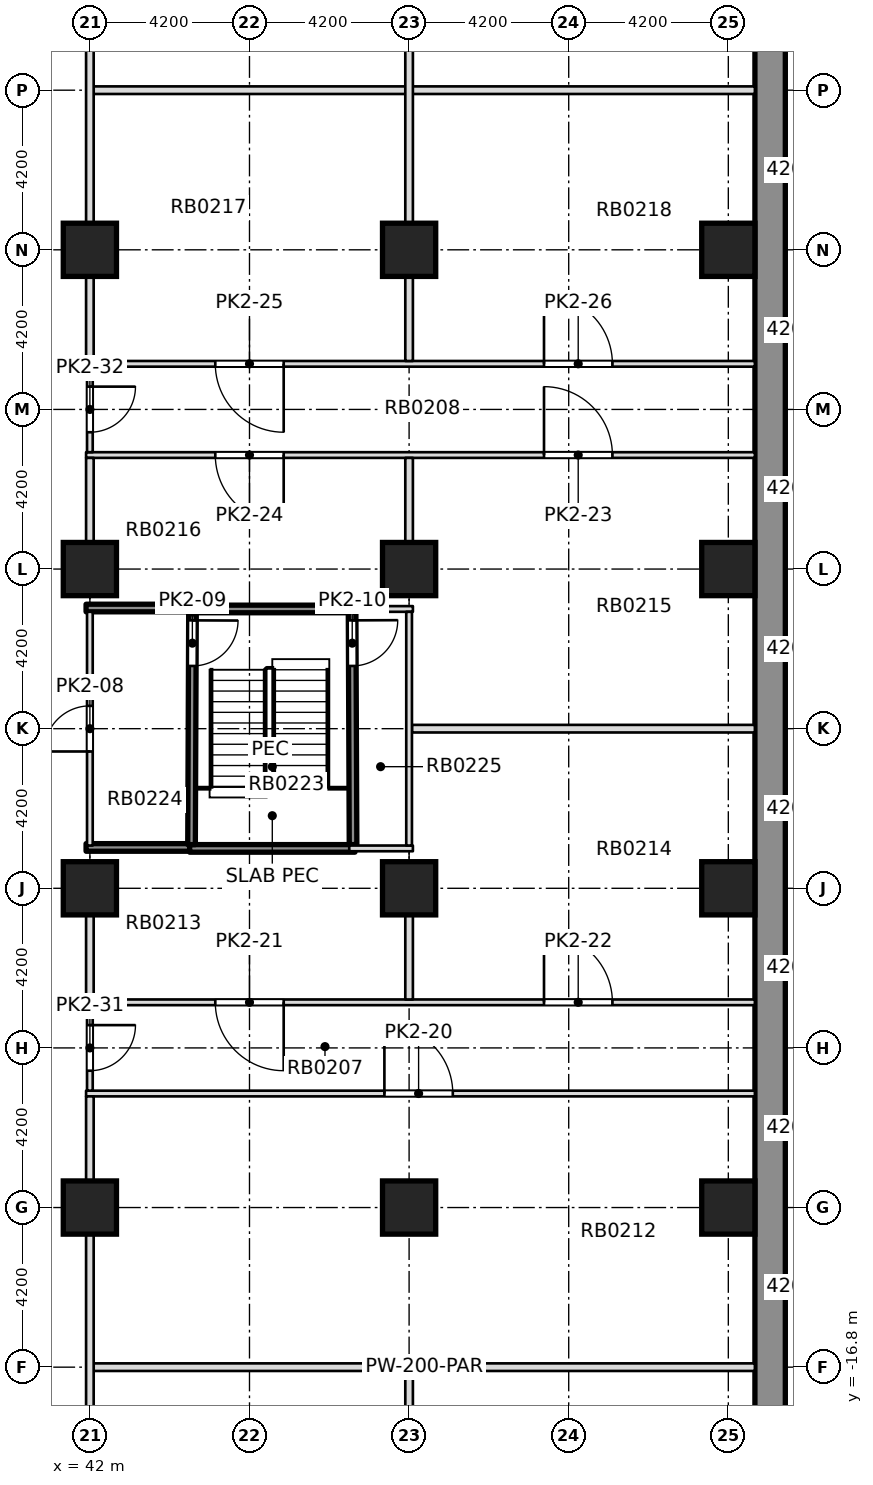
"""IFC4 building model, lengths in metres.
Left out: names, types, materials, properties, quantities, classifications, styles, units other than length and angle.
Written with IfcOpenShell. Run it as: python <this file> out.ifc"""

import sys

from ifc_helpers import new_model, si_unit, direction, frame, frame_2d, origin, origin_2d, place, context, subcontext, project, spatial, rectangle, extrude, element, fill, save


model = new_model("IFC4")
c1 = context("Model", 3, precision=1e-05, world=origin(), true_north=direction((0.0, 1.0)))
c2 = subcontext(c1, "Body", "Model", "MODEL_VIEW")
j1 = project(units=[si_unit("LENGTHUNIT", "METRE"), si_unit("PLANEANGLEUNIT", "RADIAN")], contexts=[c1])
p1 = place(None, origin())
s1 = spatial("IfcSite", under=j1, at=p1, CompositionType="ELEMENT")
p2 = place(p1, origin())
s2 = spatial("IfcBuilding", under=s1, at=p2, CompositionType="ELEMENT")
p3 = place(p2, frame((0.0, 0.0, -8.4)))
s3 = spatial("IfcBuildingStorey", under=s2, at=p3, CompositionType="ELEMENT", Elevation=-8.4)
p4 = place(p3, frame((59.9, -38.5, -0.5), z_axis=(0.0, 0.0, 1.0), x_axis=(0.0, 1.0, 0.0)))
e1 = element("IfcWall", 1, at=p4, inside=s3, PredefinedType="SOLIDWALL", context=c2, shape_type="SweptSolid", body=[
    extrude(rectangle(XDim=77.0, YDim=0.8, at=frame_2d((38.5, 0.0))), origin(), (0.0, 0.0, 1.0), 4.7),
])
for number, where, z_axis, x_axis in (
    (2, (42.0, -12.6, -0.5), (0.0, 0.0, 1.0), (1.0, 0.0, 0.0)),
    (3, (50.4, -12.6, -0.5), (0.0, 0.0, 1.0), (1.0, 0.0, 0.0)),
    (4, (58.8, -12.6, -0.5), (0.0, 0.0, 1.0), (1.0, 0.0, 0.0)),
    (5, (42.0, -4.2, -0.5), (0.0, 0.0, 1.0), (1.0, 0.0, 0.0)),
    (6, (50.4, -4.2, -0.5), (0.0, 0.0, 1.0), (1.0, 0.0, 0.0)),
    (7, (58.8, -4.2, -0.5), (0.0, 0.0, 1.0), (1.0, 0.0, 0.0)),
    (8, (42.0, 4.2, -0.5), (0.0, 0.0, 1.0), (1.0, 0.0, 0.0)),
    (9, (50.4, 4.2, -0.5), (0.0, 0.0, 1.0), (1.0, 0.0, 0.0)),
    (10, (58.8, 4.2, -0.5), (0.0, 0.0, 1.0), (1.0, 0.0, 0.0)),
    (11, (42.0, 12.6, -0.5), (0.0, 0.0, 1.0), (1.0, 0.0, 0.0)),
    (12, (50.4, 12.6, -0.5), (0.0, 0.0, 1.0), (1.0, 0.0, 0.0)),
    (13, (58.8, 12.6, -0.5), (0.0, 0.0, 1.0), (1.0, 0.0, 0.0)),
):
    element("IfcColumn", number, at=place(p3, frame(where, z_axis=z_axis, x_axis=x_axis)), inside=s3, PredefinedType="COLUMN", context=c2, shape_type="SweptSolid", body=[
        extrude(rectangle(XDim=1.4, YDim=1.4, at=origin_2d()), origin(), (0.0, 0.0, 1.0), 4.7),
    ])
p5 = place(p3, frame((42.1, -16.8, 0.0), z_axis=(0.0, 0.0, 1.0), x_axis=(1.0, 0.0, 0.0)))
e14 = element("IfcWall", 14, at=p5, inside=s3, PredefinedType="PARTITIONING", context=c2, shape_type="SweptSolid", body=[
    extrude(rectangle(XDim=17.399, YDim=0.2, at=frame_2d((8.699, 0.0))), origin(), (0.0, 0.0, 1.0), 3.85),
])
p6 = place(p3, frame((41.9, -9.6, 0.0), z_axis=(0.0, 0.0, 1.0), x_axis=(1.0, 0.0, 0.0)))
e15 = element("IfcWall", 15, at=p6, inside=s3, PredefinedType="PARTITIONING", context=c2, shape_type="SweptSolid", body=[
    extrude(rectangle(XDim=17.599, YDim=0.15, at=frame_2d((8.8, 0.0))), origin(), (0.0, 0.0, 1.0), 3.85),
])
p7 = place(p6, frame((7.85, 0.0, 0.0)))
e16 = element("IfcOpeningElement", 16, at=p7, cuts=e15, PredefinedType="OPENING", context=c2, shape_type="SweptSolid", body=[
    extrude(rectangle(XDim=1.8, YDim=2.1, at=frame_2d((0.9, 1.05))), frame((0.0, 0.085, 0.0), z_axis=(0.0, -1.0, 0.0), x_axis=(1.0, 0.0, 0.0)), (0.0, 0.0, 1.0), 0.17),
])
p8 = place(p3, frame((41.9, -7.2, 0.0), z_axis=(0.0, 0.0, 1.0), x_axis=(1.0, 0.0, 0.0)))
e17 = element("IfcWall", 17, at=p8, inside=s3, PredefinedType="PARTITIONING", context=c2, shape_type="SweptSolid", body=[
    extrude(rectangle(XDim=17.599, YDim=0.15, at=frame_2d((8.8, 0.0))), origin(), (0.0, 0.0, 1.0), 3.85),
])
p9 = place(p8, frame((3.4, 0.0, 0.0)))
e18 = element("IfcOpeningElement", 18, at=p9, cuts=e17, PredefinedType="OPENING", context=c2, shape_type="SweptSolid", body=[
    extrude(rectangle(XDim=1.8, YDim=2.1, at=frame_2d((0.9, 1.05))), frame((0.0, 0.085, 0.0), z_axis=(0.0, -1.0, 0.0), x_axis=(1.0, 0.0, 0.0)), (0.0, 0.0, 1.0), 0.17),
])
p10 = place(p8, frame((12.05, 0.0, 0.0)))
e19 = element("IfcOpeningElement", 19, at=p10, cuts=e17, PredefinedType="OPENING", context=c2, shape_type="SweptSolid", body=[
    extrude(rectangle(XDim=1.8, YDim=2.1, at=frame_2d((0.9, 1.05))), frame((0.0, 0.085, 0.0), z_axis=(0.0, -1.0, 0.0), x_axis=(1.0, 0.0, 0.0)), (0.0, 0.0, 1.0), 0.17),
])
p11 = place(p3, frame((41.9, -3.125, 0.0), z_axis=(0.0, 0.0, 1.0), x_axis=(1.0, 0.0, 0.0)))
e20 = element("IfcWall", 20, at=p11, inside=s3, PredefinedType="SOLIDWALL", context=c2, shape_type="SweptSolid", body=[
    extrude(rectangle(XDim=2.875, YDim=0.2, at=frame_2d((1.438, 0.0))), origin(), (0.0, 0.0, 1.0), 3.85),
])
p12 = place(p3, frame((44.625, -3.15, 0.0), z_axis=(0.0, 0.0, 1.0), x_axis=(1.0, 0.0, 0.0)))
e21 = element("IfcWall", 21, at=p12, inside=s3, PredefinedType="SOLIDWALL", context=c2, shape_type="SweptSolid", body=[
    extrude(rectangle(XDim=4.35, YDim=0.2, at=frame_2d((2.175, 0.0))), origin(), (0.0, 0.0, 1.0), 3.85),
])
p13 = place(p3, frame((48.825, -3.15, 0.0), z_axis=(0.0, 0.0, 1.0), x_axis=(1.0, 0.0, 0.0)))
e22 = element("IfcWall", 22, at=p13, inside=s3, PredefinedType="PARTITIONING", context=c2, shape_type="SweptSolid", body=[
    extrude(rectangle(XDim=1.675, YDim=0.15, at=frame_2d((0.837, 0.0))), origin(), (0.0, 0.0, 1.0), 3.85),
])
p14 = place(p3, frame((50.475, 0.0, 0.0), z_axis=(0.0, 0.0, 1.0), x_axis=(1.0, 0.0, 0.0)))
e23 = element("IfcWall", 23, at=p14, inside=s3, PredefinedType="PARTITIONING", context=c2, shape_type="SweptSolid", body=[
    extrude(rectangle(XDim=9.024, YDim=0.2, at=frame_2d((4.512, 0.0))), origin(), (0.0, 0.0, 1.0), 3.85),
])
p15 = place(p3, frame((41.9, 3.175, 0.0), z_axis=(0.0, 0.0, 1.0), x_axis=(1.0, 0.0, 0.0)))
e24 = element("IfcWall", 24, at=p15, inside=s3, PredefinedType="SOLIDWALL", context=c2, shape_type="SweptSolid", body=[
    extrude(rectangle(XDim=2.875, YDim=0.2, at=frame_2d((1.438, 0.0))), origin(), (0.0, 0.0, 1.0), 3.85),
])
p16 = place(p3, frame((44.625, 3.15, 0.0), z_axis=(0.0, 0.0, 1.0), x_axis=(1.0, 0.0, 0.0)))
e25 = element("IfcWall", 25, at=p16, inside=s3, PredefinedType="SOLIDWALL", context=c2, shape_type="SweptSolid", body=[
    extrude(rectangle(XDim=4.35, YDim=0.2, at=frame_2d((2.175, 0.0))), origin(), (0.0, 0.0, 1.0), 3.85),
])
p17 = place(p3, frame((48.825, 3.15, 0.0), z_axis=(0.0, 0.0, 1.0), x_axis=(1.0, 0.0, 0.0)))
e26 = element("IfcWall", 26, at=p17, inside=s3, PredefinedType="PARTITIONING", context=c2, shape_type="SweptSolid", body=[
    extrude(rectangle(XDim=1.675, YDim=0.15, at=frame_2d((0.837, 0.0))), origin(), (0.0, 0.0, 1.0), 3.85),
])
p18 = place(p3, frame((41.9, 7.2, 0.0), z_axis=(0.0, 0.0, 1.0), x_axis=(1.0, 0.0, 0.0)))
e27 = element("IfcWall", 27, at=p18, inside=s3, PredefinedType="PARTITIONING", context=c2, shape_type="SweptSolid", body=[
    extrude(rectangle(XDim=17.599, YDim=0.15, at=frame_2d((8.8, 0.0))), origin(), (0.0, 0.0, 1.0), 3.85),
])
p19 = place(p18, frame((12.05, 0.0, 0.0)))
e28 = element("IfcOpeningElement", 28, at=p19, cuts=e27, PredefinedType="OPENING", context=c2, shape_type="SweptSolid", body=[
    extrude(rectangle(XDim=1.8, YDim=2.1, at=frame_2d((0.9, 1.05))), frame((0.0, 0.085, 0.0), z_axis=(0.0, -1.0, 0.0), x_axis=(1.0, 0.0, 0.0)), (0.0, 0.0, 1.0), 0.17),
])
p20 = place(p18, frame((3.4, 0.0, 0.0)))
e29 = element("IfcOpeningElement", 29, at=p20, cuts=e27, PredefinedType="OPENING", context=c2, shape_type="SweptSolid", body=[
    extrude(rectangle(XDim=1.8, YDim=2.1, at=frame_2d((0.9, 1.05))), frame((0.0, 0.085, 0.0), z_axis=(0.0, -1.0, 0.0), x_axis=(1.0, 0.0, 0.0)), (0.0, 0.0, 1.0), 0.17),
])
p21 = place(p3, frame((41.9, 9.6, 0.0), z_axis=(0.0, 0.0, 1.0), x_axis=(1.0, 0.0, 0.0)))
e30 = element("IfcWall", 30, at=p21, inside=s3, PredefinedType="PARTITIONING", context=c2, shape_type="SweptSolid", body=[
    extrude(rectangle(XDim=17.599, YDim=0.15, at=frame_2d((8.8, 0.0))), origin(), (0.0, 0.0, 1.0), 3.85),
])
p22 = place(p21, frame((3.4, 0.0, 0.0)))
e31 = element("IfcOpeningElement", 31, at=p22, cuts=e30, PredefinedType="OPENING", context=c2, shape_type="SweptSolid", body=[
    extrude(rectangle(XDim=1.8, YDim=2.1, at=frame_2d((0.9, 1.05))), frame((0.0, 0.085, 0.0), z_axis=(0.0, -1.0, 0.0), x_axis=(1.0, 0.0, 0.0)), (0.0, 0.0, 1.0), 0.17),
])
p23 = place(p21, frame((12.05, 0.0, 0.0)))
e32 = element("IfcOpeningElement", 32, at=p23, cuts=e30, PredefinedType="OPENING", context=c2, shape_type="SweptSolid", body=[
    extrude(rectangle(XDim=1.8, YDim=2.1, at=frame_2d((0.9, 1.05))), frame((0.0, 0.085, 0.0), z_axis=(0.0, -1.0, 0.0), x_axis=(1.0, 0.0, 0.0)), (0.0, 0.0, 1.0), 0.17),
])
p24 = place(p3, frame((42.1, 16.8, 0.0), z_axis=(0.0, 0.0, 1.0), x_axis=(1.0, 0.0, 0.0)))
e33 = element("IfcWall", 33, at=p24, inside=s3, PredefinedType="PARTITIONING", context=c2, shape_type="SweptSolid", body=[
    extrude(rectangle(XDim=17.399, YDim=0.2, at=frame_2d((8.699, 0.0))), origin(), (0.0, 0.0, 1.0), 3.85),
])
p25 = place(p3, frame((42.0, -20.3, 0.0), z_axis=(0.0, 0.0, 1.0), x_axis=(0.0, 1.0, 0.0)))
e34 = element("IfcWall", 34, at=p25, inside=s3, PredefinedType="PARTITIONING", context=c2, shape_type="SweptSolid", body=[
    extrude(rectangle(XDim=7.0, YDim=0.2, at=frame_2d((3.5, 0.0))), origin(), (0.0, 0.0, 1.0), 3.85),
])
p26 = place(p3, frame((42.0, -11.9, 0.0), z_axis=(0.0, 0.0, 1.0), x_axis=(0.0, 1.0, 0.0)))
e35 = element("IfcWall", 35, at=p26, inside=s3, PredefinedType="PARTITIONING", context=c2, shape_type="SweptSolid", body=[
    extrude(rectangle(XDim=2.225, YDim=0.2, at=frame_2d((1.112, 0.0))), origin(), (0.0, 0.0, 1.0), 3.85),
])
p27 = place(p3, frame((42.0, -9.525, 0.0), z_axis=(0.0, 0.0, 1.0), x_axis=(0.0, 1.0, 0.0)))
e36 = element("IfcWall", 36, at=p27, inside=s3, PredefinedType="PARTITIONING", context=c2, shape_type="SweptSolid", body=[
    extrude(rectangle(XDim=2.25, YDim=0.15, at=frame_2d((1.125, 0.0))), origin(), (0.0, 0.0, 1.0), 3.85),
])
p28 = place(p27, frame((0.525, 0.0, 0.0)))
e37 = element("IfcOpeningElement", 37, at=p28, cuts=e36, PredefinedType="OPENING", context=c2, shape_type="SweptSolid", body=[
    extrude(rectangle(XDim=1.2, YDim=2.1, at=frame_2d((0.6, 1.05))), frame((0.0, 0.085, 0.0), z_axis=(0.0, -1.0, 0.0), x_axis=(1.0, 0.0, 0.0)), (0.0, 0.0, 1.0), 0.17),
])
p29 = place(p3, frame((42.0, -7.125, 0.0), z_axis=(0.0, 0.0, 1.0), x_axis=(0.0, 1.0, 0.0)))
e38 = element("IfcWall", 38, at=p29, inside=s3, PredefinedType="PARTITIONING", context=c2, shape_type="SweptSolid", body=[
    extrude(rectangle(XDim=2.225, YDim=0.2, at=frame_2d((1.113, 0.0))), origin(), (0.0, 0.0, 1.0), 3.85),
])
p30 = place(p3, frame((42.0, -3.075, 0.0), z_axis=(0.0, 0.0, 1.0), x_axis=(0.0, 1.0, 0.0)))
e39 = element("IfcWall", 39, at=p30, inside=s3, PredefinedType="PARTITIONING", context=c2, shape_type="SweptSolid", body=[
    extrude(rectangle(XDim=6.15, YDim=0.15, at=frame_2d((3.075, 0.0))), origin(), (0.0, 0.0, 1.0), 3.85),
])
p31 = place(p30, frame((2.475, 0.0, 0.0)))
e40 = element("IfcOpeningElement", 40, at=p31, cuts=e39, PredefinedType="OPENING", context=c2, shape_type="SweptSolid", body=[
    extrude(rectangle(XDim=1.2, YDim=2.1, at=frame_2d((0.6, 1.05))), frame((0.0, 0.085, 0.0), z_axis=(0.0, -1.0, 0.0), x_axis=(1.0, 0.0, 0.0)), (0.0, 0.0, 1.0), 0.17),
])
p32 = place(p3, frame((42.0, 4.9, 0.0), z_axis=(0.0, 0.0, 1.0), x_axis=(0.0, 1.0, 0.0)))
e41 = element("IfcWall", 41, at=p32, inside=s3, PredefinedType="PARTITIONING", context=c2, shape_type="SweptSolid", body=[
    extrude(rectangle(XDim=2.225, YDim=0.2, at=frame_2d((1.113, 0.0))), origin(), (0.0, 0.0, 1.0), 3.85),
])
p33 = place(p3, frame((42.0, 7.275, 0.0), z_axis=(0.0, 0.0, 1.0), x_axis=(0.0, 1.0, 0.0)))
e42 = element("IfcWall", 42, at=p33, inside=s3, PredefinedType="PARTITIONING", context=c2, shape_type="SweptSolid", body=[
    extrude(rectangle(XDim=2.25, YDim=0.15, at=frame_2d((1.125, 0.0))), origin(), (0.0, 0.0, 1.0), 3.85),
])
p34 = place(p33, frame((0.525, 0.0, 0.0)))
e43 = element("IfcOpeningElement", 43, at=p34, cuts=e42, PredefinedType="OPENING", context=c2, shape_type="SweptSolid", body=[
    extrude(rectangle(XDim=1.2, YDim=2.1, at=frame_2d((0.6, 1.05))), frame((0.0, 0.085, 0.0), z_axis=(0.0, -1.0, 0.0), x_axis=(1.0, 0.0, 0.0)), (0.0, 0.0, 1.0), 0.17),
])
p35 = place(p3, frame((42.0, 9.675, 0.0), z_axis=(0.0, 0.0, 1.0), x_axis=(0.0, 1.0, 0.0)))
e44 = element("IfcWall", 44, at=p35, inside=s3, PredefinedType="PARTITIONING", context=c2, shape_type="SweptSolid", body=[
    extrude(rectangle(XDim=2.225, YDim=0.2, at=frame_2d((1.112, 0.0))), origin(), (0.0, 0.0, 1.0), 3.85),
])
p36 = place(p3, frame((42.0, 13.3, 0.0), z_axis=(0.0, 0.0, 1.0), x_axis=(0.0, 1.0, 0.0)))
e45 = element("IfcWall", 45, at=p36, inside=s3, PredefinedType="PARTITIONING", context=c2, shape_type="SweptSolid", body=[
    extrude(rectangle(XDim=7.0, YDim=0.2, at=frame_2d((3.5, 0.0))), origin(), (0.0, 0.0, 1.0), 3.85),
])
p37 = place(p3, frame((44.675, -3.05, 0.0), z_axis=(0.0, 0.0, 1.0), x_axis=(0.004098985015, 0.999991599126, 0.0)))
e46 = element("IfcWall", 46, at=p37, inside=s3, PredefinedType="SOLIDWALL", context=c2, shape_type="SweptSolid", body=[
    extrude(rectangle(XDim=6.075, YDim=0.2, at=frame_2d((3.038, 0.0))), origin(), (0.0, 0.0, 1.0), 3.85),
])
p38 = place(p37, frame((4.7, 0.0, 0.0)))
e47 = element("IfcOpeningElement", 47, at=p38, cuts=e46, PredefinedType="OPENING", context=c2, shape_type="SweptSolid", body=[
    extrude(rectangle(XDim=1.2, YDim=2.1, at=frame_2d((0.6, 1.05))), frame((0.0, 0.11, 0.0), z_axis=(0.0, -1.0, 0.0), x_axis=(1.0, 0.0, 0.0)), (0.0, 0.0, 1.0), 0.22),
])
p39 = place(p3, frame((48.925, -3.05, 0.0), z_axis=(0.0, 0.0, 1.0), x_axis=(-0.004065655173, 0.99999173519, 0.0)))
e48 = element("IfcWall", 48, at=p39, inside=s3, PredefinedType="SOLIDWALL", context=c2, shape_type="SweptSolid", body=[
    extrude(rectangle(XDim=6.125, YDim=0.2, at=frame_2d((3.062, 0.0))), origin(), (0.0, 0.0, 1.0), 3.85),
])
p40 = place(p39, frame((4.7, 0.0, 0.0)))
e49 = element("IfcOpeningElement", 49, at=p40, cuts=e48, PredefinedType="OPENING", context=c2, shape_type="SweptSolid", body=[
    extrude(rectangle(XDim=1.2, YDim=2.1, at=frame_2d((0.6, 1.05))), frame((0.0, 0.11, 0.0), z_axis=(0.0, -1.0, 0.0), x_axis=(1.0, 0.0, 0.0)), (0.0, 0.0, 1.0), 0.22),
])
p41 = place(p3, frame((50.4, -20.3, 0.0), z_axis=(0.0, 0.0, 1.0), x_axis=(0.0, 1.0, 0.0)))
e50 = element("IfcWall", 50, at=p41, inside=s3, PredefinedType="PARTITIONING", context=c2, shape_type="SweptSolid", body=[
    extrude(rectangle(XDim=3.4, YDim=0.2, at=frame_2d((1.7, 0.0))), origin(), (0.0, 0.0, 1.0), 3.85),
])
p42 = place(p3, frame((50.4, -7.125, 0.0), z_axis=(0.0, 0.0, 1.0), x_axis=(0.0, 1.0, 0.0)))
e51 = element("IfcWall", 51, at=p42, inside=s3, PredefinedType="PARTITIONING", context=c2, shape_type="SweptSolid", body=[
    extrude(rectangle(XDim=2.225, YDim=0.2, at=frame_2d((1.113, 0.0))), origin(), (0.0, 0.0, 1.0), 3.85),
])
p43 = place(p3, frame((50.4, -3.075, 0.0), z_axis=(0.0, 0.0, 1.0), x_axis=(0.0, 1.0, 0.0)))
e52 = element("IfcWall", 52, at=p43, inside=s3, PredefinedType="PARTITIONING", context=c2, shape_type="SweptSolid", body=[
    extrude(rectangle(XDim=6.15, YDim=0.15, at=frame_2d((3.075, 0.0))), origin(), (0.0, 0.0, 1.0), 3.85),
])
p44 = place(p3, frame((50.4, 4.9, 0.0), z_axis=(0.0, 0.0, 1.0), x_axis=(0.0, 1.0, 0.0)))
e53 = element("IfcWall", 53, at=p44, inside=s3, PredefinedType="PARTITIONING", context=c2, shape_type="SweptSolid", body=[
    extrude(rectangle(XDim=2.225, YDim=0.2, at=frame_2d((1.113, 0.0))), origin(), (0.0, 0.0, 1.0), 3.85),
])
p45 = place(p3, frame((50.4, 9.675, 0.0), z_axis=(0.0, 0.0, 1.0), x_axis=(0.0, 1.0, 0.0)))
e54 = element("IfcWall", 54, at=p45, inside=s3, PredefinedType="PARTITIONING", context=c2, shape_type="SweptSolid", body=[
    extrude(rectangle(XDim=2.225, YDim=0.2, at=frame_2d((1.112, 0.0))), origin(), (0.0, 0.0, 1.0), 3.85),
])
p46 = place(p3, frame((50.4, 13.3, 0.0), z_axis=(0.0, 0.0, 1.0), x_axis=(0.0, 1.0, 0.0)))
e55 = element("IfcWall", 55, at=p46, inside=s3, PredefinedType="PARTITIONING", context=c2, shape_type="SweptSolid", body=[
    extrude(rectangle(XDim=7.0, YDim=0.2, at=frame_2d((3.5, 0.0))), origin(), (0.0, 0.0, 1.0), 3.85),
])
p47 = place(p31, origin())
e56 = element("IfcDoor", 56, at=p47, inside=s3, OperationType="DOUBLE_DOOR_SINGLE_SWING", PredefinedType="DOOR", context=c2, shape_type="SweptSolid", body=[
    extrude(rectangle(XDim=1.2, YDim=2.1, at=frame_2d((0.6, 1.05))), frame((0.0, 0.025, 0.0), z_axis=(0.0, -1.0, 0.0), x_axis=(1.0, 0.0, 0.0)), (0.0, 0.0, 1.0), 0.05),
])
fill(e40, e56)
p48 = place(p38, origin())
e57 = element("IfcDoor", 57, at=p48, inside=s3, OperationType="DOUBLE_DOOR_SINGLE_SWING", PredefinedType="DOOR", context=c2, shape_type="SweptSolid", body=[
    extrude(rectangle(XDim=1.2, YDim=2.1, at=frame_2d((0.6, 1.05))), frame((0.0, 0.025, 0.0), z_axis=(0.0, -1.0, 0.0), x_axis=(1.0, 0.0, 0.0)), (0.0, 0.0, 1.0), 0.05),
])
fill(e47, e57)
p49 = place(p40, origin())
e58 = element("IfcDoor", 58, at=p49, inside=s3, OperationType="DOUBLE_DOOR_SINGLE_SWING", PredefinedType="DOOR", context=c2, shape_type="SweptSolid", body=[
    extrude(rectangle(XDim=1.2, YDim=2.1, at=frame_2d((0.6, 1.05))), frame((0.0, 0.025, 0.0), z_axis=(0.0, -1.0, 0.0), x_axis=(1.0, 0.0, 0.0)), (0.0, 0.0, 1.0), 0.05),
])
fill(e49, e58)
p50 = place(p7, origin())
e59 = element("IfcDoor", 59, at=p50, inside=s3, OperationType="DOUBLE_DOOR_SINGLE_SWING", PredefinedType="DOOR", context=c2, shape_type="SweptSolid", body=[
    extrude(rectangle(XDim=1.8, YDim=2.1, at=frame_2d((0.9, 1.05))), frame((0.0, 0.025, 0.0), z_axis=(0.0, -1.0, 0.0), x_axis=(1.0, 0.0, 0.0)), (0.0, 0.0, 1.0), 0.05),
])
fill(e16, e59)
p51 = place(p9, origin())
e60 = element("IfcDoor", 60, at=p51, inside=s3, OperationType="DOUBLE_DOOR_SINGLE_SWING", PredefinedType="DOOR", context=c2, shape_type="SweptSolid", body=[
    extrude(rectangle(XDim=1.8, YDim=2.1, at=frame_2d((0.9, 1.05))), frame((0.0, 0.025, 0.0), z_axis=(0.0, -1.0, 0.0), x_axis=(1.0, 0.0, 0.0)), (0.0, 0.0, 1.0), 0.05),
])
fill(e18, e60)
p52 = place(p10, origin())
e61 = element("IfcDoor", 61, at=p52, inside=s3, OperationType="DOUBLE_DOOR_SINGLE_SWING", PredefinedType="DOOR", context=c2, shape_type="SweptSolid", body=[
    extrude(rectangle(XDim=1.8, YDim=2.1, at=frame_2d((0.9, 1.05))), frame((0.0, 0.025, 0.0), z_axis=(0.0, -1.0, 0.0), x_axis=(1.0, 0.0, 0.0)), (0.0, 0.0, 1.0), 0.05),
])
fill(e19, e61)
p53 = place(p19, origin())
e62 = element("IfcDoor", 62, at=p53, inside=s3, OperationType="DOUBLE_DOOR_SINGLE_SWING", PredefinedType="DOOR", context=c2, shape_type="SweptSolid", body=[
    extrude(rectangle(XDim=1.8, YDim=2.1, at=frame_2d((0.9, 1.05))), frame((0.0, 0.025, 0.0), z_axis=(0.0, -1.0, 0.0), x_axis=(1.0, 0.0, 0.0)), (0.0, 0.0, 1.0), 0.05),
])
fill(e28, e62)
p54 = place(p20, origin())
e63 = element("IfcDoor", 63, at=p54, inside=s3, OperationType="DOUBLE_DOOR_SINGLE_SWING", PredefinedType="DOOR", context=c2, shape_type="SweptSolid", body=[
    extrude(rectangle(XDim=1.8, YDim=2.1, at=frame_2d((0.9, 1.05))), frame((0.0, 0.025, 0.0), z_axis=(0.0, -1.0, 0.0), x_axis=(1.0, 0.0, 0.0)), (0.0, 0.0, 1.0), 0.05),
])
fill(e29, e63)
p55 = place(p22, origin())
e64 = element("IfcDoor", 64, at=p55, inside=s3, OperationType="DOUBLE_DOOR_SINGLE_SWING", PredefinedType="DOOR", context=c2, shape_type="SweptSolid", body=[
    extrude(rectangle(XDim=1.8, YDim=2.1, at=frame_2d((0.9, 1.05))), frame((0.0, 0.025, 0.0), z_axis=(0.0, -1.0, 0.0), x_axis=(1.0, 0.0, 0.0)), (0.0, 0.0, 1.0), 0.05),
])
fill(e31, e64)
p56 = place(p23, origin())
e65 = element("IfcDoor", 65, at=p56, inside=s3, OperationType="DOUBLE_DOOR_SINGLE_SWING", PredefinedType="DOOR", context=c2, shape_type="SweptSolid", body=[
    extrude(rectangle(XDim=1.8, YDim=2.1, at=frame_2d((0.9, 1.05))), frame((0.0, 0.025, 0.0), z_axis=(0.0, -1.0, 0.0), x_axis=(1.0, 0.0, 0.0)), (0.0, 0.0, 1.0), 0.05),
])
fill(e32, e65)
p57 = place(p28, origin())
e66 = element("IfcDoor", 66, at=p57, inside=s3, OperationType="SINGLE_SWING_RIGHT", PredefinedType="DOOR", context=c2, shape_type="SweptSolid", body=[
    extrude(rectangle(XDim=1.2, YDim=2.1, at=frame_2d((0.6, 1.05))), frame((0.0, 0.025, 0.0), z_axis=(0.0, -1.0, 0.0), x_axis=(1.0, 0.0, 0.0)), (0.0, 0.0, 1.0), 0.05),
])
fill(e37, e66)
p58 = place(p34, origin())
e67 = element("IfcDoor", 67, at=p58, inside=s3, OperationType="SINGLE_SWING_LEFT", PredefinedType="DOOR", context=c2, shape_type="SweptSolid", body=[
    extrude(rectangle(XDim=1.2, YDim=2.1, at=frame_2d((0.6, 1.05))), frame((0.0, 0.025, 0.0), z_axis=(0.0, -1.0, 0.0), x_axis=(1.0, 0.0, 0.0)), (0.0, 0.0, 1.0), 0.05),
])
fill(e43, e67)
save(model, sys.argv[1])
